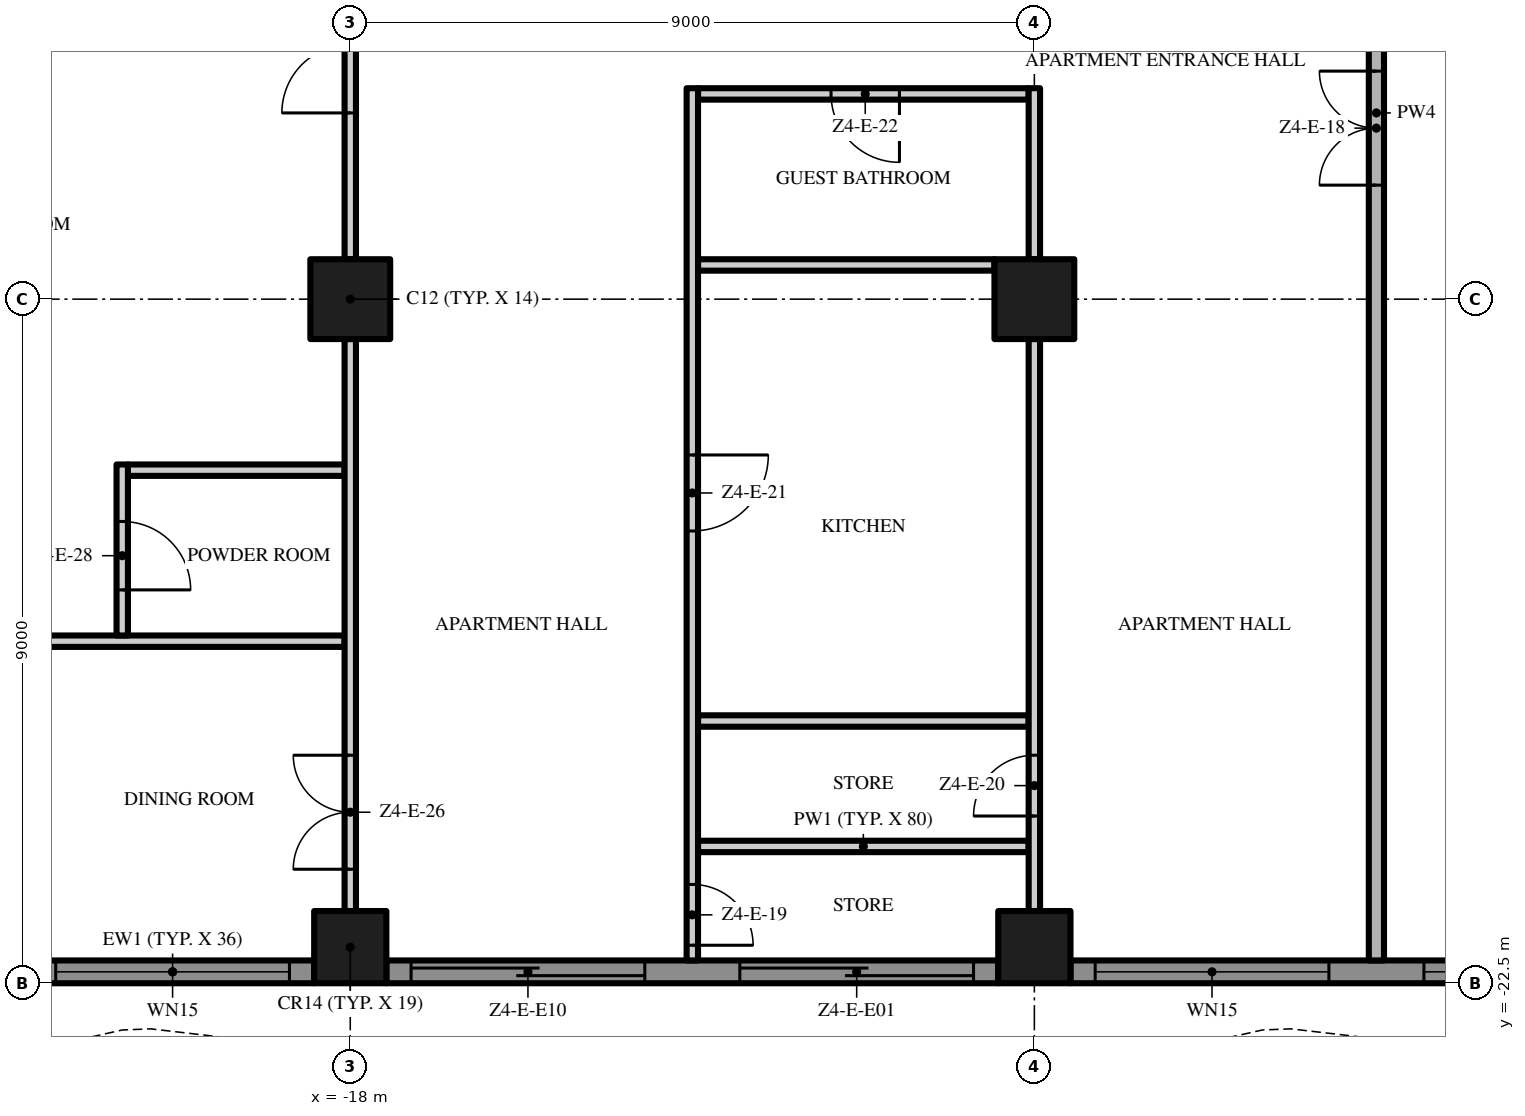
"""IFC4 building model, lengths in metres.
Left out: names, types, materials, properties, quantities, classifications, styles, units other than length and angle.
Written with IfcOpenShell. Run it as: python <this file> out.ifc"""

import sys

from ifc_helpers import new_model, si_unit, direction, frame, frame_2d, origin, origin_2d, place, context, subcontext, project, spatial, polyline, rectangle, outline, extrude, element, fill, save


model = new_model("IFC4")
c1 = context("Model", 3, precision=1e-05, world=origin(), true_north=direction((0.0, 1.0)))
c2 = subcontext(c1, "Body", "Model", "MODEL_VIEW")
j1 = project(units=[si_unit("LENGTHUNIT", "METRE"), si_unit("PLANEANGLEUNIT", "RADIAN")], contexts=[c1])
p1 = place(None, origin())
s1 = spatial("IfcSite", under=j1, at=p1, CompositionType="ELEMENT")
p2 = place(p1, origin())
s2 = spatial("IfcBuilding", under=s1, at=p2, CompositionType="ELEMENT")
p3 = place(p2, frame((0.0, 0.0, 230.0)))
s3 = spatial("IfcBuildingStorey", under=s2, at=p3, CompositionType="ELEMENT", Elevation=230.0)
p4 = place(p3, frame((-18.0, -13.5, 0.0), z_axis=(0.0, 0.0, 1.0), x_axis=(1.0, 0.0, 0.0)))
e1 = element("IfcColumn", 1, at=p4, inside=s3, PredefinedType="COLUMN", context=c2, shape_type="SweptSolid", body=[
    extrude(rectangle(XDim=1.05, YDim=1.05, at=origin_2d()), origin(), (0.0, 0.0, 1.0), 3.5),
])
p5 = place(p3, frame((-18.0, -22.025, 0.0), z_axis=(0.0, 0.0, 1.0), x_axis=(1.0, 0.0, 0.0)))
e2 = element("IfcColumn", 2, at=p5, inside=s3, PredefinedType="COLUMN", context=c2, shape_type="SweptSolid", body=[
    extrude(rectangle(XDim=0.95, YDim=0.95, at=origin_2d()), origin(), (0.0, 0.0, 1.0), 3.5),
])
p6 = place(p3, frame((-9.0, -13.5, 0.0), z_axis=(0.0, 0.0, 1.0), x_axis=(1.0, 0.0, 0.0)))
e3 = element("IfcColumn", 3, at=p6, inside=s3, PredefinedType="COLUMN", context=c2, shape_type="SweptSolid", body=[
    extrude(rectangle(XDim=1.05, YDim=1.05, at=origin_2d()), origin(), (0.0, 0.0, 1.0), 3.5),
])
p7 = place(p3, frame((-9.0, -22.025, 0.0), z_axis=(0.0, 0.0, 1.0), x_axis=(1.0, 0.0, 0.0)))
e4 = element("IfcColumn", 4, at=p7, inside=s3, PredefinedType="COLUMN", context=c2, shape_type="SweptSolid", body=[
    extrude(rectangle(XDim=0.95, YDim=0.95, at=origin_2d()), origin(), (0.0, 0.0, 1.0), 3.5),
])
p8 = place(p3, frame((-18.475, -22.35, 0.0), z_axis=(0.0, 0.0, 1.0), x_axis=(-1.0, 0.0, 0.0)))
e5 = element("IfcWall", 5, at=p8, inside=s3, PredefinedType="SOLIDWALL", context=c2, shape_type="SweptSolid", body=[
    extrude(rectangle(XDim=3.725, YDim=0.3, at=frame_2d((1.863, 0.0))), origin(), (0.0, 0.0, 1.0), 3.5),
])
p9 = place(p8, frame((0.325, 0.0, 0.45)))
e6 = element("IfcOpeningElement", 6, at=p9, cuts=e5, PredefinedType="OPENING", context=c2, shape_type="SweptSolid", body=[
    extrude(rectangle(XDim=3.075, YDim=2.65, at=frame_2d((1.538, 1.325))), frame((0.0, 0.16, 0.0), z_axis=(0.0, -1.0, 0.0), x_axis=(1.0, 0.0, 0.0)), (0.0, 0.0, 1.0), 0.32),
])
p10 = place(p3, frame((-9.475, -22.35, 0.0), z_axis=(0.0, 0.0, 1.0), x_axis=(-1.0, 0.0, 0.0)))
e7 = element("IfcWall", 7, at=p10, inside=s3, PredefinedType="SOLIDWALL", context=c2, shape_type="SweptSolid", body=[
    extrude(rectangle(XDim=8.05, YDim=0.3, at=frame_2d((4.025, 0.0))), origin(), (0.0, 0.0, 1.0), 3.5),
])
p11 = place(p10, frame((4.65, 0.0, 0.0)))
e8 = element("IfcOpeningElement", 8, at=p11, cuts=e7, PredefinedType="OPENING", context=c2, shape_type="SweptSolid", body=[
    extrude(rectangle(XDim=3.075, YDim=2.4, at=frame_2d((1.538, 1.2))), frame((0.0, 0.16, 0.0), z_axis=(0.0, -1.0, 0.0), x_axis=(1.0, 0.0, 0.0)), (0.0, 0.0, 1.0), 0.32),
])
p12 = place(p10, frame((0.325, 0.0, 0.0)))
e9 = element("IfcOpeningElement", 9, at=p12, cuts=e7, PredefinedType="OPENING", context=c2, shape_type="SweptSolid", body=[
    extrude(rectangle(XDim=3.075, YDim=2.4, at=frame_2d((1.538, 1.2))), frame((0.0, 0.16, 0.0), z_axis=(0.0, -1.0, 0.0), x_axis=(1.0, 0.0, 0.0)), (0.0, 0.0, 1.0), 0.32),
])
p13 = place(p3, frame((-0.475, -22.35, 0.0), z_axis=(0.0, 0.0, 1.0), x_axis=(-1.0, 0.0, 0.0)))
e10 = element("IfcWall", 10, at=p13, inside=s3, PredefinedType="SOLIDWALL", context=c2, shape_type="SweptSolid", body=[
    extrude(rectangle(XDim=8.05, YDim=0.3, at=frame_2d((4.025, 0.0))), origin(), (0.0, 0.0, 1.0), 3.5),
])
p14 = place(p13, frame((4.65, 0.0, 0.45)))
e11 = element("IfcOpeningElement", 11, at=p14, cuts=e10, PredefinedType="OPENING", context=c2, shape_type="SweptSolid", body=[
    extrude(rectangle(XDim=3.075, YDim=2.65, at=frame_2d((1.538, 1.325))), frame((0.0, 0.16, 0.0), z_axis=(0.0, -1.0, 0.0), x_axis=(1.0, 0.0, 0.0)), (0.0, 0.0, 1.0), 0.32),
])
p15 = place(p13, frame((0.325, 0.0, 0.45)))
e12 = element("IfcOpeningElement", 12, at=p15, cuts=e10, PredefinedType="OPENING", context=c2, shape_type="SweptSolid", body=[
    extrude(rectangle(XDim=3.075, YDim=2.65, at=frame_2d((1.538, 1.325))), frame((0.0, 0.16, 0.0), z_axis=(0.0, -1.0, 0.0), x_axis=(1.0, 0.0, 0.0)), (0.0, 0.0, 1.0), 0.32),
])
p16 = place(p3, origin())
e13 = element("IfcWall", 13, at=p16, inside=s3, PredefinedType="USERDEFINED", context=c2, shape_type="SweptSolid", body=[
    extrude(outline(polyline([(-22.5, -23.451), (-21.0, -23.115), (-20.625, -23.1), (-19.5, -23.231), (-18.0, -23.755), (-16.5, -24.488), (-15.0, -25.149), (-13.5, -25.485), (-13.125, -25.5), (-12.0, -25.369), (-10.5, -24.845), (-9.0, -24.112), (-7.5, -23.451), (-6.0, -23.115), (-5.625, -23.1), (-4.5, -23.231), (-3.0, -23.755), (-1.5, -24.488), (0.0, -25.149), (1.5, -25.485), (1.875, -25.5), (3.0, -25.369), (4.5, -24.845), (6.0, -24.112), (7.5, -23.451), (9.0, -23.115), (9.375, -23.1), (10.5, -23.231), (12.0, -23.755), (13.5, -24.488), (15.0, -25.149), (16.5, -25.485), (16.875, -25.5), (18.0, -25.369), (19.5, -24.845), (21.0, -24.112), (22.5, -23.451), (22.399, -23.223), (20.895, -23.885), (19.404, -24.614), (17.944, -25.124), (16.865, -25.249), (16.533, -25.236), (15.079, -24.91), (13.605, -24.261), (12.096, -23.524), (10.556, -22.986), (9.385, -22.849), (8.967, -22.866), (7.421, -23.213), (5.895, -23.885), (4.404, -24.614), (2.944, -25.124), (1.865, -25.249), (1.533, -25.236), (0.079, -24.91), (-1.395, -24.261), (-2.904, -23.524), (-4.444, -22.986), (-5.615, -22.849), (-6.033, -22.866), (-7.579, -23.213), (-9.105, -23.885), (-10.596, -24.614), (-12.056, -25.124), (-13.135, -25.249), (-13.467, -25.236), (-14.921, -24.91), (-16.395, -24.261), (-17.904, -23.524), (-19.444, -22.986), (-20.615, -22.849), (-21.033, -22.866), (-22.555, -23.208), (-22.5, -23.451)])), origin(), (0.0, 0.0, 1.0), 0.9),
])
for number, where, z_axis, x_axis in (
    (14, (-13.425, -20.7, 0.0), (0.0, 0.0, 1.0), (1.0, 0.0, 0.0)),
    (15, (-13.425, -19.05, 0.0), (0.0, 0.0, 1.0), (1.0, 0.0, 0.0)),
):
    element("IfcWall", number, at=place(p3, frame(where, z_axis=z_axis, x_axis=x_axis)), inside=s3, PredefinedType="PARTITIONING", context=c2, shape_type="SweptSolid", body=[
        extrude(rectangle(XDim=4.35, YDim=0.15, at=frame_2d((2.175, 0.0))), origin(), (0.0, 0.0, 1.0), 3.5),
    ])
p17 = place(p3, frame((-22.025, -18.0, 0.0), z_axis=(0.0, 0.0, 1.0), x_axis=(1.0, 0.0, 0.0)))
e16 = element("IfcWall", 16, at=p17, inside=s3, PredefinedType="PARTITIONING", context=c2, shape_type="SweptSolid", body=[
    extrude(rectangle(XDim=3.95, YDim=0.15, at=frame_2d((1.975, 0.0))), origin(), (0.0, 0.0, 1.0), 3.5),
])
p18 = place(p3, frame((-20.925, -15.75, 0.0), z_axis=(0.0, 0.0, 1.0), x_axis=(1.0, 0.0, 0.0)))
e17 = element("IfcWall", 17, at=p18, inside=s3, PredefinedType="PARTITIONING", context=c2, shape_type="SweptSolid", body=[
    extrude(rectangle(XDim=2.85, YDim=0.15, at=frame_2d((1.425, 0.0))), origin(), (0.0, 0.0, 1.0), 3.5),
])
p19 = place(p3, frame((-13.425, -13.05, 0.0), z_axis=(0.0, 0.0, 1.0), x_axis=(1.0, 0.0, 0.0)))
e18 = element("IfcWall", 18, at=p19, inside=s3, PredefinedType="PARTITIONING", context=c2, shape_type="SweptSolid", body=[
    extrude(rectangle(XDim=3.9, YDim=0.15, at=frame_2d((1.95, 0.0))), origin(), (0.0, 0.0, 1.0), 3.5),
])
p20 = place(p3, frame((-9.075, -10.8, 0.0), z_axis=(0.0, 0.0, 1.0), x_axis=(-1.0, 0.0, 0.0)))
e19 = element("IfcWall", 19, at=p20, inside=s3, PredefinedType="PARTITIONING", context=c2, shape_type="SweptSolid", body=[
    extrude(rectangle(XDim=4.35, YDim=0.15, at=frame_2d((2.175, 0.0))), origin(), (0.0, 0.0, 1.0), 3.5),
])
p21 = place(p20, frame((1.7, 0.0, 0.0)))
e20 = element("IfcOpeningElement", 20, at=p21, cuts=e19, PredefinedType="OPENING", context=c2, shape_type="SweptSolid", body=[
    extrude(rectangle(XDim=0.9, YDim=2.1, at=frame_2d((0.45, 1.05))), frame((0.0, 0.085, 0.0), z_axis=(0.0, -1.0, 0.0), x_axis=(1.0, 0.0, 0.0)), (0.0, 0.0, 1.0), 0.17),
])
p22 = place(p3, frame((-21.0, -15.675, 0.0), z_axis=(0.0, 0.0, 1.0), x_axis=(0.0, -1.0, 0.0)))
e21 = element("IfcWall", 21, at=p22, inside=s3, PredefinedType="PARTITIONING", context=c2, shape_type="SweptSolid", body=[
    extrude(rectangle(XDim=2.25, YDim=0.15, at=frame_2d((1.125, 0.0))), origin(), (0.0, 0.0, 1.0), 3.5),
])
p23 = place(p22, frame((0.75, 0.0, 0.0)))
e22 = element("IfcOpeningElement", 22, at=p23, cuts=e21, PredefinedType="OPENING", context=c2, shape_type="SweptSolid", body=[
    extrude(rectangle(XDim=0.9, YDim=2.1, at=frame_2d((0.45, 1.05))), frame((0.0, 0.085, 0.0), z_axis=(0.0, -1.0, 0.0), x_axis=(1.0, 0.0, 0.0)), (0.0, 0.0, 1.0), 0.17),
])
p24 = place(p3, frame((-18.0, -21.55, 0.0), z_axis=(0.0, 0.0, 1.0), x_axis=(0.0, 1.0, 0.0)))
e23 = element("IfcWall", 23, at=p24, inside=s3, PredefinedType="PARTITIONING", context=c2, shape_type="SweptSolid", body=[
    extrude(rectangle(XDim=7.525, YDim=0.15, at=frame_2d((3.763, 0.0))), origin(), (0.0, 0.0, 1.0), 3.5),
])
p25 = place(p24, frame((0.55, 0.0, 0.0)))
e24 = element("IfcOpeningElement", 24, at=p25, cuts=e23, PredefinedType="OPENING", context=c2, shape_type="SweptSolid", body=[
    extrude(rectangle(XDim=1.5, YDim=2.4, at=frame_2d((0.75, 1.2))), frame((0.0, 0.085, 0.0), z_axis=(0.0, -1.0, 0.0), x_axis=(1.0, 0.0, 0.0)), (0.0, 0.0, 1.0), 0.17),
])
p26 = place(p3, frame((-18.0, -12.975, 0.0), z_axis=(0.0, 0.0, 1.0), x_axis=(0.0, 1.0, 0.0)))
e25 = element("IfcWall", 25, at=p26, inside=s3, PredefinedType="PARTITIONING", context=c2, shape_type="SweptSolid", body=[
    extrude(rectangle(XDim=7.95, YDim=0.15, at=frame_2d((3.975, 0.0))), origin(), (0.0, 0.0, 1.0), 3.5),
])
p27 = place(p26, frame((1.925, 0.0, 0.0)))
e26 = element("IfcOpeningElement", 26, at=p27, cuts=e25, PredefinedType="OPENING", context=c2, shape_type="SweptSolid", body=[
    extrude(rectangle(XDim=1.8, YDim=2.4, at=frame_2d((0.9, 1.2))), frame((0.0, 0.085, 0.0), z_axis=(0.0, -1.0, 0.0), x_axis=(1.0, 0.0, 0.0)), (0.0, 0.0, 1.0), 0.17),
])
p28 = place(p26, frame((6.8, 0.0, 0.0)))
e27 = element("IfcOpeningElement", 27, at=p28, cuts=e25, PredefinedType="OPENING", context=c2, shape_type="SweptSolid", body=[
    extrude(rectangle(XDim=1.0, YDim=2.4, at=frame_2d((0.5, 1.2))), frame((0.0, 0.085, 0.0), z_axis=(0.0, -1.0, 0.0), x_axis=(1.0, 0.0, 0.0)), (0.0, 0.0, 1.0), 0.17),
])
p29 = place(p3, frame((-13.5, -10.725, 0.0), z_axis=(0.0, 0.0, 1.0), x_axis=(0.0, -1.0, 0.0)))
e28 = element("IfcWall", 28, at=p29, inside=s3, PredefinedType="PARTITIONING", context=c2, shape_type="SweptSolid", body=[
    extrude(rectangle(XDim=11.475, YDim=0.15, at=frame_2d((5.737, 0.0))), origin(), (0.0, 0.0, 1.0), 3.5),
])
p30 = place(p29, frame((10.475, 0.0, 0.0)))
e29 = element("IfcOpeningElement", 29, at=p30, cuts=e28, PredefinedType="OPENING", context=c2, shape_type="SweptSolid", body=[
    extrude(rectangle(XDim=0.8, YDim=2.0, at=frame_2d((0.4, 1.0))), frame((0.0, 0.085, 0.0), z_axis=(0.0, -1.0, 0.0), x_axis=(1.0, 0.0, 0.0)), (0.0, 0.0, 1.0), 0.17),
])
p31 = place(p29, frame((4.825, 0.0, 0.0)))
e30 = element("IfcOpeningElement", 30, at=p31, cuts=e28, PredefinedType="OPENING", context=c2, shape_type="SweptSolid", body=[
    extrude(rectangle(XDim=1.0, YDim=2.4, at=frame_2d((0.5, 1.2))), frame((0.0, 0.085, 0.0), z_axis=(0.0, -1.0, 0.0), x_axis=(1.0, 0.0, 0.0)), (0.0, 0.0, 1.0), 0.17),
])
p32 = place(p3, frame((-9.0, -21.55, 0.0), z_axis=(0.0, 0.0, 1.0), x_axis=(0.0, 1.0, 0.0)))
e31 = element("IfcWall", 31, at=p32, inside=s3, PredefinedType="PARTITIONING", context=c2, shape_type="SweptSolid", body=[
    extrude(rectangle(XDim=7.525, YDim=0.15, at=frame_2d((3.763, 0.0))), origin(), (0.0, 0.0, 1.0), 3.5),
])
p33 = place(p32, frame((1.25, 0.0, 0.0)))
e32 = element("IfcOpeningElement", 32, at=p33, cuts=e31, PredefinedType="OPENING", context=c2, shape_type="SweptSolid", body=[
    extrude(rectangle(XDim=0.8, YDim=2.0, at=frame_2d((0.4, 1.0))), frame((0.0, 0.085, 0.0), z_axis=(0.0, -1.0, 0.0), x_axis=(1.0, 0.0, 0.0)), (0.0, 0.0, 1.0), 0.17),
])
p34 = place(p3, frame((-9.0, -12.975, 0.0), z_axis=(0.0, 0.0, 1.0), x_axis=(0.0, 1.0, 0.0)))
e33 = element("IfcWall", 33, at=p34, inside=s3, PredefinedType="PARTITIONING", context=c2, shape_type="SweptSolid", body=[
    extrude(rectangle(XDim=2.25, YDim=0.15, at=frame_2d((1.125, 0.0))), origin(), (0.0, 0.0, 1.0), 3.5),
])
p35 = place(p3, frame((-4.5, -22.2, 0.0), z_axis=(0.0, 0.0, 1.0), x_axis=(0.0, 1.0, 0.0)))
e34 = element("IfcWall", 34, at=p35, inside=s3, PredefinedType="PARTITIONING", context=c2, shape_type="SweptSolid", body=[
    extrude(rectangle(XDim=22.3, YDim=0.2, at=frame_2d((11.15, 0.0))), origin(), (0.0, 0.0, 1.0), 3.5),
])
p36 = place(p35, frame((10.2, 0.0, 0.0)))
e35 = element("IfcOpeningElement", 35, at=p36, cuts=e34, PredefinedType="OPENING", context=c2, shape_type="SweptSolid", body=[
    extrude(rectangle(XDim=1.5, YDim=2.4, at=frame_2d((0.75, 1.2))), frame((0.0, 0.11, 0.0), z_axis=(0.0, -1.0, 0.0), x_axis=(1.0, 0.0, 0.0)), (0.0, 0.0, 1.0), 0.22),
])
p37 = place(p9, origin())
e36 = element("IfcWindow", 36, at=p37, inside=s3, PartitioningType="SINGLE_PANEL", PredefinedType="WINDOW", context=c2, shape_type="SweptSolid", body=[
    extrude(rectangle(XDim=3.075, YDim=2.65, at=frame_2d((1.538, 1.325))), frame((0.0, 0.03, 0.0), z_axis=(0.0, -1.0, 0.0), x_axis=(1.0, 0.0, 0.0)), (0.0, 0.0, 1.0), 0.06),
])
fill(e6, e36)
p38 = place(p11, origin())
e37 = element("IfcDoor", 37, at=p38, inside=s3, OperationType="SINGLE_SWING_LEFT", PredefinedType="DOOR", context=c2, shape_type="SweptSolid", body=[
    extrude(rectangle(XDim=3.075, YDim=2.4, at=frame_2d((1.538, 1.2))), frame((0.0, 0.025, 0.0), z_axis=(0.0, -1.0, 0.0), x_axis=(1.0, 0.0, 0.0)), (0.0, 0.0, 1.0), 0.05),
])
fill(e8, e37)
p39 = place(p12, origin())
e38 = element("IfcDoor", 38, at=p39, inside=s3, OperationType="SINGLE_SWING_LEFT", PredefinedType="DOOR", context=c2, shape_type="SweptSolid", body=[
    extrude(rectangle(XDim=3.075, YDim=2.4, at=frame_2d((1.538, 1.2))), frame((0.0, 0.025, 0.0), z_axis=(0.0, -1.0, 0.0), x_axis=(1.0, 0.0, 0.0)), (0.0, 0.0, 1.0), 0.05),
])
fill(e9, e38)
p40 = place(p14, origin())
e39 = element("IfcWindow", 39, at=p40, inside=s3, PartitioningType="SINGLE_PANEL", PredefinedType="WINDOW", context=c2, shape_type="SweptSolid", body=[
    extrude(rectangle(XDim=3.075, YDim=2.65, at=frame_2d((1.538, 1.325))), frame((0.0, 0.03, 0.0), z_axis=(0.0, -1.0, 0.0), x_axis=(1.0, 0.0, 0.0)), (0.0, 0.0, 1.0), 0.06),
])
fill(e11, e39)
p41 = place(p15, origin())
e40 = element("IfcWindow", 40, at=p41, inside=s3, PartitioningType="SINGLE_PANEL", PredefinedType="WINDOW", context=c2, shape_type="SweptSolid", body=[
    extrude(rectangle(XDim=3.075, YDim=2.65, at=frame_2d((1.538, 1.325))), frame((0.0, 0.03, 0.0), z_axis=(0.0, -1.0, 0.0), x_axis=(1.0, 0.0, 0.0)), (0.0, 0.0, 1.0), 0.06),
])
fill(e12, e40)
p42 = place(p36, origin())
e41 = element("IfcDoor", 41, at=p42, inside=s3, OperationType="DOUBLE_DOOR_SINGLE_SWING", PredefinedType="DOOR", context=c2, shape_type="SweptSolid", body=[
    extrude(rectangle(XDim=1.5, YDim=2.4, at=frame_2d((0.75, 1.2))), frame((0.0, 0.025, 0.0), z_axis=(0.0, -1.0, 0.0), x_axis=(1.0, 0.0, 0.0)), (0.0, 0.0, 1.0), 0.05),
])
fill(e35, e41)
p43 = place(p30, origin())
e42 = element("IfcDoor", 42, at=p43, inside=s3, OperationType="SINGLE_SWING_RIGHT", PredefinedType="DOOR", context=c2, shape_type="SweptSolid", body=[
    extrude(rectangle(XDim=0.8, YDim=2.0, at=frame_2d((0.4, 1.0))), frame((0.0, 0.025, 0.0), z_axis=(0.0, -1.0, 0.0), x_axis=(1.0, 0.0, 0.0)), (0.0, 0.0, 1.0), 0.05),
])
fill(e29, e42)
p44 = place(p33, origin())
e43 = element("IfcDoor", 43, at=p44, inside=s3, OperationType="SINGLE_SWING_LEFT", PredefinedType="DOOR", context=c2, shape_type="SweptSolid", body=[
    extrude(rectangle(XDim=0.8, YDim=2.0, at=frame_2d((0.4, 1.0))), frame((0.0, 0.025, 0.0), z_axis=(0.0, -1.0, 0.0), x_axis=(1.0, 0.0, 0.0)), (0.0, 0.0, 1.0), 0.05),
])
fill(e32, e43)
p45 = place(p31, origin())
e44 = element("IfcDoor", 44, at=p45, inside=s3, OperationType="SINGLE_SWING_LEFT", PredefinedType="DOOR", context=c2, shape_type="SweptSolid", body=[
    extrude(rectangle(XDim=1.0, YDim=2.4, at=frame_2d((0.5, 1.2))), frame((0.0, 0.025, 0.0), z_axis=(0.0, -1.0, 0.0), x_axis=(1.0, 0.0, 0.0)), (0.0, 0.0, 1.0), 0.05),
])
fill(e30, e44)
p46 = place(p21, origin())
e45 = element("IfcDoor", 45, at=p46, inside=s3, OperationType="SINGLE_SWING_LEFT", PredefinedType="DOOR", context=c2, shape_type="SweptSolid", body=[
    extrude(rectangle(XDim=0.9, YDim=2.1, at=frame_2d((0.45, 1.05))), frame((0.0, 0.025, 0.0), z_axis=(0.0, -1.0, 0.0), x_axis=(1.0, 0.0, 0.0)), (0.0, 0.0, 1.0), 0.05),
])
fill(e20, e45)
p47 = place(p25, origin())
e46 = element("IfcDoor", 46, at=p47, inside=s3, OperationType="DOUBLE_DOOR_SINGLE_SWING", PredefinedType="DOOR", context=c2, shape_type="SweptSolid", body=[
    extrude(rectangle(XDim=1.5, YDim=2.4, at=frame_2d((0.75, 1.2))), frame((0.0, 0.025, 0.0), z_axis=(0.0, -1.0, 0.0), x_axis=(1.0, 0.0, 0.0)), (0.0, 0.0, 1.0), 0.05),
])
fill(e24, e46)
p48 = place(p27, origin())
e47 = element("IfcDoor", 47, at=p48, inside=s3, OperationType="DOUBLE_DOOR_SINGLE_SWING", PredefinedType="DOOR", context=c2, shape_type="SweptSolid", body=[
    extrude(rectangle(XDim=1.8, YDim=2.4, at=frame_2d((0.9, 1.2))), frame((0.0, 0.025, 0.0), z_axis=(0.0, -1.0, 0.0), x_axis=(1.0, 0.0, 0.0)), (0.0, 0.0, 1.0), 0.05),
])
fill(e26, e47)
p49 = place(p23, origin())
e48 = element("IfcDoor", 48, at=p49, inside=s3, OperationType="SINGLE_SWING_RIGHT", PredefinedType="DOOR", context=c2, shape_type="SweptSolid", body=[
    extrude(rectangle(XDim=0.9, YDim=2.1, at=frame_2d((0.45, 1.05))), frame((0.0, 0.025, 0.0), z_axis=(0.0, -1.0, 0.0), x_axis=(1.0, 0.0, 0.0)), (0.0, 0.0, 1.0), 0.05),
])
fill(e22, e48)
save(model, sys.argv[1])
